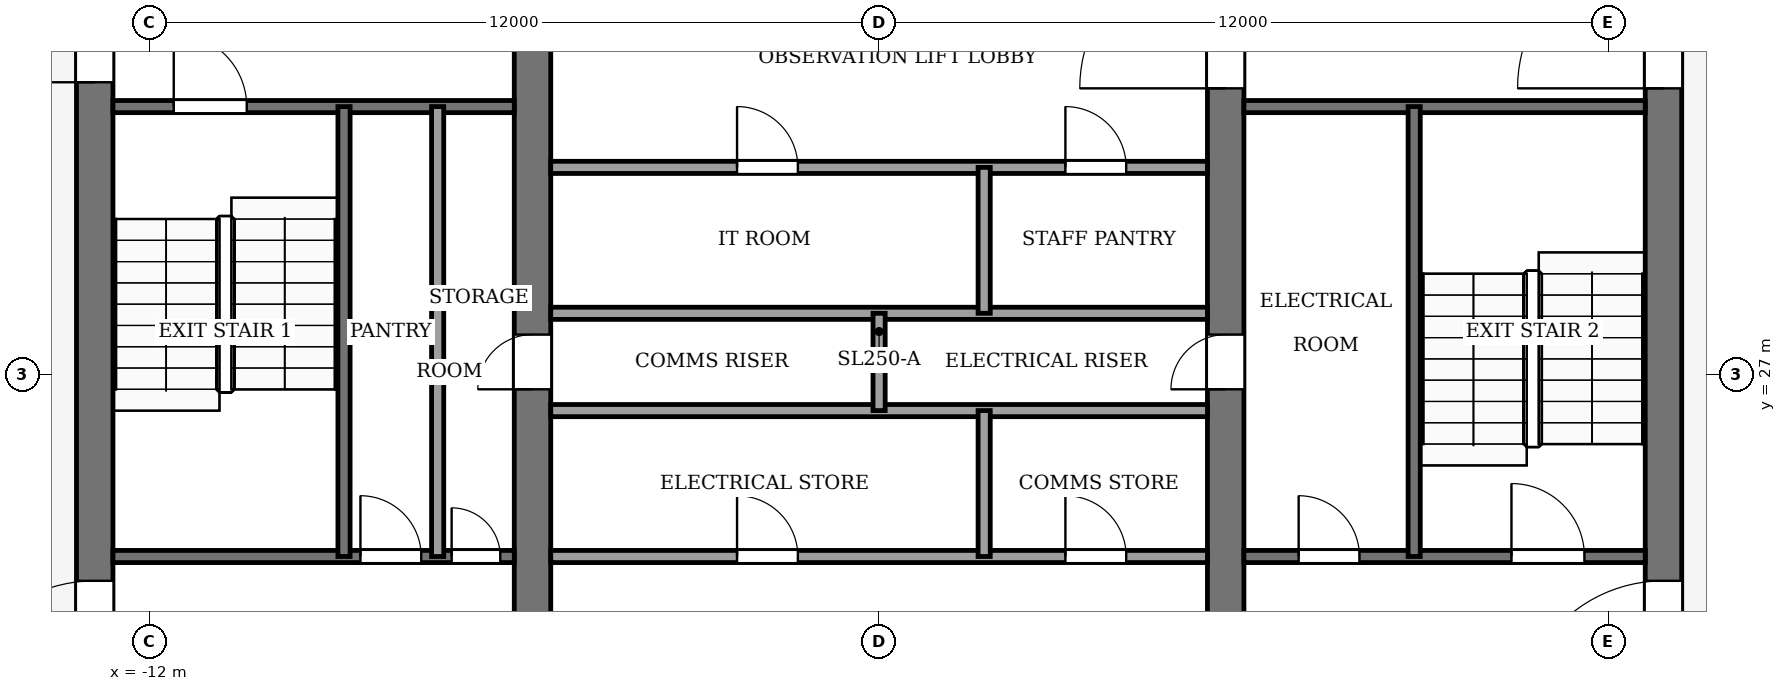
"""IFC4 building model, lengths in metres.
Left out: names, types, materials, properties, quantities, classifications, styles, units other than length and angle.
Written with IfcOpenShell. Run it as: python <this file> out.ifc"""

import sys

from ifc_helpers import new_model, si_unit, direction, frame, frame_2d, origin, place, context, subcontext, project, spatial, rectangle, extrude, element, fill, save


model = new_model("IFC4")
c1 = context("Model", 3, precision=1e-05, world=origin(), true_north=direction((0.0, 1.0)))
c2 = subcontext(c1, "Body", "Model", "MODEL_VIEW")
j1 = project(units=[si_unit("LENGTHUNIT", "METRE"), si_unit("PLANEANGLEUNIT", "RADIAN")], contexts=[c1])
p1 = place(None, origin())
s1 = spatial("IfcSite", under=j1, at=p1, CompositionType="ELEMENT")
p2 = place(p1, origin())
s2 = spatial("IfcBuilding", under=s1, at=p2, CompositionType="ELEMENT")
p3 = place(p2, frame((0.0, 0.0, 334.0)))
s3 = spatial("IfcBuildingStorey", under=s2, at=p3, CompositionType="ELEMENT", Elevation=334.0)
p4 = place(p3, frame((-12.9, 18.4, -0.18), z_axis=(0.0, 0.0, 1.0), x_axis=(0.0, 1.0, 0.0)))
e1 = element("IfcWall", 1, at=p4, inside=s3, PredefinedType="SHEAR", context=c2, shape_type="SweptSolid", body=[
    extrude(rectangle(XDim=19.2, YDim=0.6, at=frame_2d((9.6, 0.0))), origin(), (0.0, 0.0, 1.0), 6.53),
])
p5 = place(p4, frame((2.8, 0.0, 0.18)))
e2 = element("IfcOpeningElement", 2, at=p5, cuts=e1, PredefinedType="OPENING", context=c2, shape_type="SweptSolid", body=[
    extrude(rectangle(XDim=2.4, YDim=2.4, at=frame_2d((1.2, 1.2))), frame((0.0, 0.31, 0.0), z_axis=(0.0, -1.0, 0.0), x_axis=(1.0, 0.0, 0.0)), (0.0, 0.0, 1.0), 0.62),
])
p6 = place(p4, frame((13.4, 0.0, 0.18)))
e3 = element("IfcOpeningElement", 3, at=p6, cuts=e1, PredefinedType="OPENING", context=c2, shape_type="SweptSolid", body=[
    extrude(rectangle(XDim=1.4, YDim=2.2, at=frame_2d((0.7, 1.1))), frame((0.0, 0.31, 0.0), z_axis=(0.0, -1.0, 0.0), x_axis=(1.0, 0.0, 0.0)), (0.0, 0.0, 1.0), 0.62),
])
p7 = place(p3, frame((12.9, 18.4, -0.18), z_axis=(0.0, 0.0, 1.0), x_axis=(0.0, 1.0, 0.0)))
e4 = element("IfcWall", 4, at=p7, inside=s3, PredefinedType="SHEAR", context=c2, shape_type="SweptSolid", body=[
    extrude(rectangle(XDim=19.2, YDim=0.6, at=frame_2d((9.6, 0.0))), origin(), (0.0, 0.0, 1.0), 6.53),
])
p8 = place(p7, frame((2.8, 0.0, 0.18)))
e5 = element("IfcOpeningElement", 5, at=p8, cuts=e4, PredefinedType="OPENING", context=c2, shape_type="SweptSolid", body=[
    extrude(rectangle(XDim=2.4, YDim=2.4, at=frame_2d((1.2, 1.2))), frame((0.0, 0.31, 0.0), z_axis=(0.0, -1.0, 0.0), x_axis=(1.0, 0.0, 0.0)), (0.0, 0.0, 1.0), 0.62),
])
p9 = place(p7, frame((13.3, 0.0, 0.18)))
e6 = element("IfcOpeningElement", 6, at=p9, cuts=e4, PredefinedType="OPENING", context=c2, shape_type="SweptSolid", body=[
    extrude(rectangle(XDim=2.4, YDim=2.4, at=frame_2d((1.2, 1.2))), frame((0.0, 0.31, 0.0), z_axis=(0.0, -1.0, 0.0), x_axis=(1.0, 0.0, 0.0)), (0.0, 0.0, 1.0), 0.62),
])
p10 = place(p3, frame((-5.7, 18.4, -0.18), z_axis=(0.0, 0.0, 1.0), x_axis=(0.0, 1.0, 0.0)))
e7 = element("IfcWall", 7, at=p10, inside=s3, PredefinedType="SHEAR", context=c2, shape_type="SweptSolid", body=[
    extrude(rectangle(XDim=19.2, YDim=0.6, at=frame_2d((9.6, 0.0))), origin(), (0.0, 0.0, 1.0), 6.53),
])
p11 = place(p10, frame((8.35, 0.0, 0.18)))
e8 = element("IfcOpeningElement", 8, at=p11, cuts=e7, PredefinedType="OPENING", context=c2, shape_type="SweptSolid", body=[
    extrude(rectangle(XDim=0.9, YDim=2.1, at=frame_2d((0.45, 1.05))), frame((0.0, 0.31, 0.0), z_axis=(0.0, -1.0, 0.0), x_axis=(1.0, 0.0, 0.0)), (0.0, 0.0, 1.0), 0.62),
])
p12 = place(p3, frame((5.7, 18.4, -0.18), z_axis=(0.0, 0.0, 1.0), x_axis=(0.0, 1.0, 0.0)))
e9 = element("IfcWall", 9, at=p12, inside=s3, PredefinedType="SHEAR", context=c2, shape_type="SweptSolid", body=[
    extrude(rectangle(XDim=19.2, YDim=0.6, at=frame_2d((9.6, 0.0))), origin(), (0.0, 0.0, 1.0), 6.53),
])
p13 = place(p12, frame((8.35, 0.0, 0.18)))
e10 = element("IfcOpeningElement", 10, at=p13, cuts=e9, PredefinedType="OPENING", context=c2, shape_type="SweptSolid", body=[
    extrude(rectangle(XDim=0.9, YDim=2.1, at=frame_2d((0.45, 1.05))), frame((0.0, 0.31, 0.0), z_axis=(0.0, -1.0, 0.0), x_axis=(1.0, 0.0, 0.0)), (0.0, 0.0, 1.0), 0.62),
])
p14 = place(p12, frame((13.3, 0.0, 0.18)))
e11 = element("IfcOpeningElement", 11, at=p14, cuts=e9, PredefinedType="OPENING", context=c2, shape_type="SweptSolid", body=[
    extrude(rectangle(XDim=2.4, YDim=2.4, at=frame_2d((1.2, 1.2))), frame((0.0, 0.31, 0.0), z_axis=(0.0, -1.0, 0.0), x_axis=(1.0, 0.0, 0.0)), (0.0, 0.0, 1.0), 0.62),
])
p15 = place(p3, frame((-12.6, 24.0, 0.0), z_axis=(0.0, 0.0, 1.0), x_axis=(1.0, 0.0, 0.0)))
e12 = element("IfcWall", 12, at=p15, inside=s3, PredefinedType="PARTITIONING", context=c2, shape_type="SweptSolid", body=[
    extrude(rectangle(XDim=6.6, YDim=0.2, at=frame_2d((3.3, 0.0))), origin(), (0.0, 0.0, 1.0), 6.35),
])
p16 = place(p15, frame((4.07, 0.0, 0.0)))
e13 = element("IfcOpeningElement", 13, at=p16, cuts=e12, PredefinedType="OPENING", context=c2, shape_type="SweptSolid", body=[
    extrude(rectangle(XDim=1.0, YDim=2.1, at=frame_2d((0.5, 1.05))), frame((0.0, 0.11, 0.0), z_axis=(0.0, -1.0, 0.0), x_axis=(1.0, 0.0, 0.0)), (0.0, 0.0, 1.0), 0.22),
])
p17 = place(p15, frame((5.57, 0.0, 0.0)))
e14 = element("IfcOpeningElement", 14, at=p17, cuts=e12, PredefinedType="OPENING", context=c2, shape_type="SweptSolid", body=[
    extrude(rectangle(XDim=0.8, YDim=2.1, at=frame_2d((0.4, 1.05))), frame((0.0, 0.11, 0.0), z_axis=(0.0, -1.0, 0.0), x_axis=(1.0, 0.0, 0.0)), (0.0, 0.0, 1.0), 0.22),
])
p18 = place(p3, frame((-5.4, 24.0, 0.0), z_axis=(0.0, 0.0, 1.0), x_axis=(1.0, 0.0, 0.0)))
e15 = element("IfcWall", 15, at=p18, inside=s3, PredefinedType="PARTITIONING", context=c2, shape_type="SweptSolid", body=[
    extrude(rectangle(XDim=10.8, YDim=0.2, at=frame_2d((5.4, 0.0))), origin(), (0.0, 0.0, 1.0), 6.35),
])
p19 = place(p18, frame((3.064, 0.0, 0.0)))
e16 = element("IfcOpeningElement", 16, at=p19, cuts=e15, PredefinedType="OPENING", context=c2, shape_type="SweptSolid", body=[
    extrude(rectangle(XDim=1.0, YDim=2.1, at=frame_2d((0.5, 1.05))), frame((0.0, 0.11, 0.0), z_axis=(0.0, -1.0, 0.0), x_axis=(1.0, 0.0, 0.0)), (0.0, 0.0, 1.0), 0.22),
])
p20 = place(p18, frame((8.464, 0.0, 0.0)))
e17 = element("IfcOpeningElement", 17, at=p20, cuts=e15, PredefinedType="OPENING", context=c2, shape_type="SweptSolid", body=[
    extrude(rectangle(XDim=1.0, YDim=2.1, at=frame_2d((0.5, 1.05))), frame((0.0, 0.11, 0.0), z_axis=(0.0, -1.0, 0.0), x_axis=(1.0, 0.0, 0.0)), (0.0, 0.0, 1.0), 0.22),
])
p21 = place(p3, frame((6.0, 24.0, 0.0), z_axis=(0.0, 0.0, 1.0), x_axis=(1.0, 0.0, 0.0)))
e18 = element("IfcWall", 18, at=p21, inside=s3, PredefinedType="PARTITIONING", context=c2, shape_type="SweptSolid", body=[
    extrude(rectangle(XDim=6.6, YDim=0.2, at=frame_2d((3.3, 0.0))), origin(), (0.0, 0.0, 1.0), 6.35),
])
p22 = place(p21, frame((0.9, 0.0, 0.0)))
e19 = element("IfcOpeningElement", 19, at=p22, cuts=e18, PredefinedType="OPENING", context=c2, shape_type="SweptSolid", body=[
    extrude(rectangle(XDim=1.0, YDim=2.1, at=frame_2d((0.5, 1.05))), frame((0.0, 0.11, 0.0), z_axis=(0.0, -1.0, 0.0), x_axis=(1.0, 0.0, 0.0)), (0.0, 0.0, 1.0), 0.22),
])
p23 = place(p21, frame((4.4, 0.0, 0.0)))
e20 = element("IfcOpeningElement", 20, at=p23, cuts=e18, PredefinedType="OPENING", context=c2, shape_type="SweptSolid", body=[
    extrude(rectangle(XDim=1.2, YDim=2.2, at=frame_2d((0.6, 1.1))), frame((0.0, 0.11, 0.0), z_axis=(0.0, -1.0, 0.0), x_axis=(1.0, 0.0, 0.0)), (0.0, 0.0, 1.0), 0.22),
])
for number, where, z_axis, x_axis in (
    (21, (-5.4, 26.4, 0.0), (0.0, 0.0, 1.0), (1.0, 0.0, 0.0)),
    (22, (-5.4, 28.0, 0.0), (0.0, 0.0, 1.0), (1.0, 0.0, 0.0)),
):
    element("IfcWall", number, at=place(p3, frame(where, z_axis=z_axis, x_axis=x_axis)), inside=s3, PredefinedType="PARTITIONING", context=c2, shape_type="SweptSolid", body=[
        extrude(rectangle(XDim=10.8, YDim=0.2, at=frame_2d((5.4, 0.0))), origin(), (0.0, 0.0, 1.0), 6.35),
    ])
p24 = place(p3, frame((-5.4, 30.4, 0.0), z_axis=(0.0, 0.0, 1.0), x_axis=(1.0, 0.0, 0.0)))
e23 = element("IfcWall", 23, at=p24, inside=s3, PredefinedType="PARTITIONING", context=c2, shape_type="SweptSolid", body=[
    extrude(rectangle(XDim=10.8, YDim=0.2, at=frame_2d((5.4, 0.0))), origin(), (0.0, 0.0, 1.0), 6.35),
])
p25 = place(p24, frame((3.064, 0.0, 0.0)))
e24 = element("IfcOpeningElement", 24, at=p25, cuts=e23, PredefinedType="OPENING", context=c2, shape_type="SweptSolid", body=[
    extrude(rectangle(XDim=1.0, YDim=2.1, at=frame_2d((0.5, 1.05))), frame((0.0, 0.11, 0.0), z_axis=(0.0, -1.0, 0.0), x_axis=(1.0, 0.0, 0.0)), (0.0, 0.0, 1.0), 0.22),
])
p26 = place(p24, frame((8.464, 0.0, 0.0)))
e25 = element("IfcOpeningElement", 25, at=p26, cuts=e23, PredefinedType="OPENING", context=c2, shape_type="SweptSolid", body=[
    extrude(rectangle(XDim=1.0, YDim=2.1, at=frame_2d((0.5, 1.05))), frame((0.0, 0.11, 0.0), z_axis=(0.0, -1.0, 0.0), x_axis=(1.0, 0.0, 0.0)), (0.0, 0.0, 1.0), 0.22),
])
p27 = place(p3, frame((-12.6, 31.4, 0.0), z_axis=(0.0, 0.0, 1.0), x_axis=(1.0, 0.0, 0.0)))
e26 = element("IfcWall", 26, at=p27, inside=s3, PredefinedType="PARTITIONING", context=c2, shape_type="SweptSolid", body=[
    extrude(rectangle(XDim=6.6, YDim=0.2, at=frame_2d((3.3, 0.0))), origin(), (0.0, 0.0, 1.0), 6.35),
])
p28 = place(p27, frame((1.0, 0.0, 0.0)))
e27 = element("IfcOpeningElement", 27, at=p28, cuts=e26, PredefinedType="OPENING", context=c2, shape_type="SweptSolid", body=[
    extrude(rectangle(XDim=1.2, YDim=2.2, at=frame_2d((0.6, 1.1))), frame((0.0, 0.11, 0.0), z_axis=(0.0, -1.0, 0.0), x_axis=(1.0, 0.0, 0.0)), (0.0, 0.0, 1.0), 0.22),
])
p29 = place(p3, frame((6.0, 31.4, 0.0), z_axis=(0.0, 0.0, 1.0), x_axis=(1.0, 0.0, 0.0)))
e28 = element("IfcWall", 28, at=p29, inside=s3, PredefinedType="PARTITIONING", context=c2, shape_type="SweptSolid", body=[
    extrude(rectangle(XDim=6.6, YDim=0.2, at=frame_2d((3.3, 0.0))), origin(), (0.0, 0.0, 1.0), 6.35),
])
for number, where, z_axis, x_axis in (
    (29, (-8.8, 24.0, 0.0), (0.0, 0.0, 1.0), (0.0, 1.0, 0.0)),
    (30, (-7.26, 24.0, 0.0), (0.0, 0.0, 1.0), (0.0, 1.0, 0.0)),
):
    element("IfcWall", number, at=place(p3, frame(where, z_axis=z_axis, x_axis=x_axis)), inside=s3, PredefinedType="PARTITIONING", context=c2, shape_type="SweptSolid", body=[
        extrude(rectangle(XDim=7.4, YDim=0.2, at=frame_2d((3.7, 0.0))), origin(), (0.0, 0.0, 1.0), 6.35),
    ])
p30 = place(p3, frame((0.0, 26.4, 0.0), z_axis=(0.0, 0.0, 1.0), x_axis=(0.0, 1.0, 0.0)))
e31 = element("IfcWall", 31, at=p30, inside=s3, PredefinedType="PARTITIONING", context=c2, shape_type="SweptSolid", body=[
    extrude(rectangle(XDim=1.6, YDim=0.2, at=frame_2d((0.8, 0.0))), origin(), (0.0, 0.0, 1.0), 6.35),
])
for number, where, z_axis, x_axis in (
    (32, (1.728, 24.0, 0.0), (0.0, 0.0, 1.0), (0.0, 1.0, 0.0)),
    (33, (1.728, 28.0, 0.0), (0.0, 0.0, 1.0), (0.0, 1.0, 0.0)),
):
    element("IfcWall", number, at=place(p3, frame(where, z_axis=z_axis, x_axis=x_axis)), inside=s3, PredefinedType="PARTITIONING", context=c2, shape_type="SweptSolid", body=[
        extrude(rectangle(XDim=2.4, YDim=0.2, at=frame_2d((1.2, 0.0))), origin(), (0.0, 0.0, 1.0), 6.35),
    ])
p31 = place(p3, frame((8.8, 24.0, 0.0), z_axis=(0.0, 0.0, 1.0), x_axis=(0.0, 1.0, 0.0)))
e34 = element("IfcWall", 34, at=p31, inside=s3, PredefinedType="PARTITIONING", context=c2, shape_type="SweptSolid", body=[
    extrude(rectangle(XDim=7.4, YDim=0.2, at=frame_2d((3.7, 0.0))), origin(), (0.0, 0.0, 1.0), 6.35),
])
p32 = place(p19, origin())
e35 = element("IfcDoor", 35, at=p32, inside=s3, OperationType="SINGLE_SWING_RIGHT", PredefinedType="DOOR", context=c2, shape_type="SweptSolid", body=[
    extrude(rectangle(XDim=1.0, YDim=2.1, at=frame_2d((0.5, 1.05))), frame((0.0, 0.025, 0.0), z_axis=(0.0, -1.0, 0.0), x_axis=(1.0, 0.0, 0.0)), (0.0, 0.0, 1.0), 0.05),
])
fill(e16, e35)
p33 = place(p20, origin())
e36 = element("IfcDoor", 36, at=p33, inside=s3, OperationType="SINGLE_SWING_LEFT", PredefinedType="DOOR", context=c2, shape_type="SweptSolid", body=[
    extrude(rectangle(XDim=1.0, YDim=2.1, at=frame_2d((0.5, 1.05))), frame((0.0, 0.025, 0.0), z_axis=(0.0, -1.0, 0.0), x_axis=(1.0, 0.0, 0.0)), (0.0, 0.0, 1.0), 0.05),
])
fill(e17, e36)
p34 = place(p25, origin())
e37 = element("IfcDoor", 37, at=p34, inside=s3, OperationType="SINGLE_SWING_RIGHT", PredefinedType="DOOR", context=c2, shape_type="SweptSolid", body=[
    extrude(rectangle(XDim=1.0, YDim=2.1, at=frame_2d((0.5, 1.05))), frame((0.0, 0.025, 0.0), z_axis=(0.0, -1.0, 0.0), x_axis=(1.0, 0.0, 0.0)), (0.0, 0.0, 1.0), 0.05),
])
fill(e24, e37)
p35 = place(p26, origin())
e38 = element("IfcDoor", 38, at=p35, inside=s3, OperationType="SINGLE_SWING_LEFT", PredefinedType="DOOR", context=c2, shape_type="SweptSolid", body=[
    extrude(rectangle(XDim=1.0, YDim=2.1, at=frame_2d((0.5, 1.05))), frame((0.0, 0.025, 0.0), z_axis=(0.0, -1.0, 0.0), x_axis=(1.0, 0.0, 0.0)), (0.0, 0.0, 1.0), 0.05),
])
fill(e25, e38)
p36 = place(p16, origin())
e39 = element("IfcDoor", 39, at=p36, inside=s3, OperationType="SINGLE_SWING_RIGHT", PredefinedType="DOOR", context=c2, shape_type="SweptSolid", body=[
    extrude(rectangle(XDim=1.0, YDim=2.1, at=frame_2d((0.5, 1.05))), frame((0.0, 0.025, 0.0), z_axis=(0.0, -1.0, 0.0), x_axis=(1.0, 0.0, 0.0)), (0.0, 0.0, 1.0), 0.05),
])
fill(e13, e39)
p37 = place(p17, origin())
e40 = element("IfcDoor", 40, at=p37, inside=s3, OperationType="SINGLE_SWING_LEFT", PredefinedType="DOOR", context=c2, shape_type="SweptSolid", body=[
    extrude(rectangle(XDim=0.8, YDim=2.1, at=frame_2d((0.4, 1.05))), frame((0.0, 0.025, 0.0), z_axis=(0.0, -1.0, 0.0), x_axis=(1.0, 0.0, 0.0)), (0.0, 0.0, 1.0), 0.05),
])
fill(e14, e40)
p38 = place(p22, origin())
e41 = element("IfcDoor", 41, at=p38, inside=s3, OperationType="SINGLE_SWING_RIGHT", PredefinedType="DOOR", context=c2, shape_type="SweptSolid", body=[
    extrude(rectangle(XDim=1.0, YDim=2.1, at=frame_2d((0.5, 1.05))), frame((0.0, 0.025, 0.0), z_axis=(0.0, -1.0, 0.0), x_axis=(1.0, 0.0, 0.0)), (0.0, 0.0, 1.0), 0.05),
])
fill(e19, e41)
p39 = place(p11, origin())
e42 = element("IfcDoor", 42, at=p39, inside=s3, OperationType="SINGLE_SWING_LEFT", PredefinedType="DOOR", context=c2, shape_type="SweptSolid", body=[
    extrude(rectangle(XDim=0.9, YDim=2.1, at=frame_2d((0.45, 1.05))), frame((0.0, 0.025, 0.0), z_axis=(0.0, -1.0, 0.0), x_axis=(1.0, 0.0, 0.0)), (0.0, 0.0, 1.0), 0.05),
])
fill(e8, e42)
p40 = place(p13, origin())
e43 = element("IfcDoor", 43, at=p40, inside=s3, OperationType="SINGLE_SWING_RIGHT", PredefinedType="DOOR", context=c2, shape_type="SweptSolid", body=[
    extrude(rectangle(XDim=0.9, YDim=2.1, at=frame_2d((0.45, 1.05))), frame((0.0, 0.025, 0.0), z_axis=(0.0, -1.0, 0.0), x_axis=(1.0, 0.0, 0.0)), (0.0, 0.0, 1.0), 0.05),
])
fill(e10, e43)
p41 = place(p28, origin())
e44 = element("IfcDoor", 44, at=p41, inside=s3, OperationType="SINGLE_SWING_RIGHT", PredefinedType="DOOR", context=c2, shape_type="SweptSolid", body=[
    extrude(rectangle(XDim=1.2, YDim=2.2, at=frame_2d((0.6, 1.1))), frame((0.0, 0.025, 0.0), z_axis=(0.0, -1.0, 0.0), x_axis=(1.0, 0.0, 0.0)), (0.0, 0.0, 1.0), 0.05),
])
fill(e27, e44)
p42 = place(p23, origin())
e45 = element("IfcDoor", 45, at=p42, inside=s3, OperationType="SINGLE_SWING_LEFT", PredefinedType="DOOR", context=c2, shape_type="SweptSolid", body=[
    extrude(rectangle(XDim=1.2, YDim=2.2, at=frame_2d((0.6, 1.1))), frame((0.0, 0.025, 0.0), z_axis=(0.0, -1.0, 0.0), x_axis=(1.0, 0.0, 0.0)), (0.0, 0.0, 1.0), 0.05),
])
fill(e20, e45)
p43 = place(p14, origin())
e46 = element("IfcDoor", 46, at=p43, inside=s3, OperationType="DOUBLE_DOOR_SINGLE_SWING", PredefinedType="DOOR", context=c2, shape_type="SweptSolid", body=[
    extrude(rectangle(XDim=2.4, YDim=2.4, at=frame_2d((1.2, 1.2))), frame((0.0, 0.025, 0.0), z_axis=(0.0, -1.0, 0.0), x_axis=(1.0, 0.0, 0.0)), (0.0, 0.0, 1.0), 0.05),
])
fill(e11, e46)
p44 = place(p5, origin())
e47 = element("IfcDoor", 47, at=p44, inside=s3, OperationType="DOUBLE_DOOR_SINGLE_SWING", PredefinedType="DOOR", context=c2, shape_type="SweptSolid", body=[
    extrude(rectangle(XDim=2.4, YDim=2.4, at=frame_2d((1.2, 1.2))), frame((0.0, 0.025, 0.0), z_axis=(0.0, -1.0, 0.0), x_axis=(1.0, 0.0, 0.0)), (0.0, 0.0, 1.0), 0.05),
])
fill(e2, e47)
p45 = place(p8, origin())
e48 = element("IfcDoor", 48, at=p45, inside=s3, OperationType="DOUBLE_DOOR_SINGLE_SWING", PredefinedType="DOOR", context=c2, shape_type="SweptSolid", body=[
    extrude(rectangle(XDim=2.4, YDim=2.4, at=frame_2d((1.2, 1.2))), frame((0.0, 0.025, 0.0), z_axis=(0.0, -1.0, 0.0), x_axis=(1.0, 0.0, 0.0)), (0.0, 0.0, 1.0), 0.05),
])
fill(e5, e48)
p46 = place(p9, origin())
e49 = element("IfcDoor", 49, at=p46, inside=s3, OperationType="DOUBLE_DOOR_SINGLE_SWING", PredefinedType="DOOR", context=c2, shape_type="SweptSolid", body=[
    extrude(rectangle(XDim=2.4, YDim=2.4, at=frame_2d((1.2, 1.2))), frame((0.0, 0.025, 0.0), z_axis=(0.0, -1.0, 0.0), x_axis=(1.0, 0.0, 0.0)), (0.0, 0.0, 1.0), 0.05),
])
fill(e6, e49)
p47 = place(p6, origin())
e50 = element("IfcDoor", 50, at=p47, inside=s3, OperationType="SINGLE_SWING_RIGHT", PredefinedType="DOOR", context=c2, shape_type="SweptSolid", body=[
    extrude(rectangle(XDim=1.4, YDim=2.2, at=frame_2d((0.7, 1.1))), frame((0.0, 0.025, 0.0), z_axis=(0.0, -1.0, 0.0), x_axis=(1.0, 0.0, 0.0)), (0.0, 0.0, 1.0), 0.05),
])
fill(e3, e50)
save(model, sys.argv[1])
